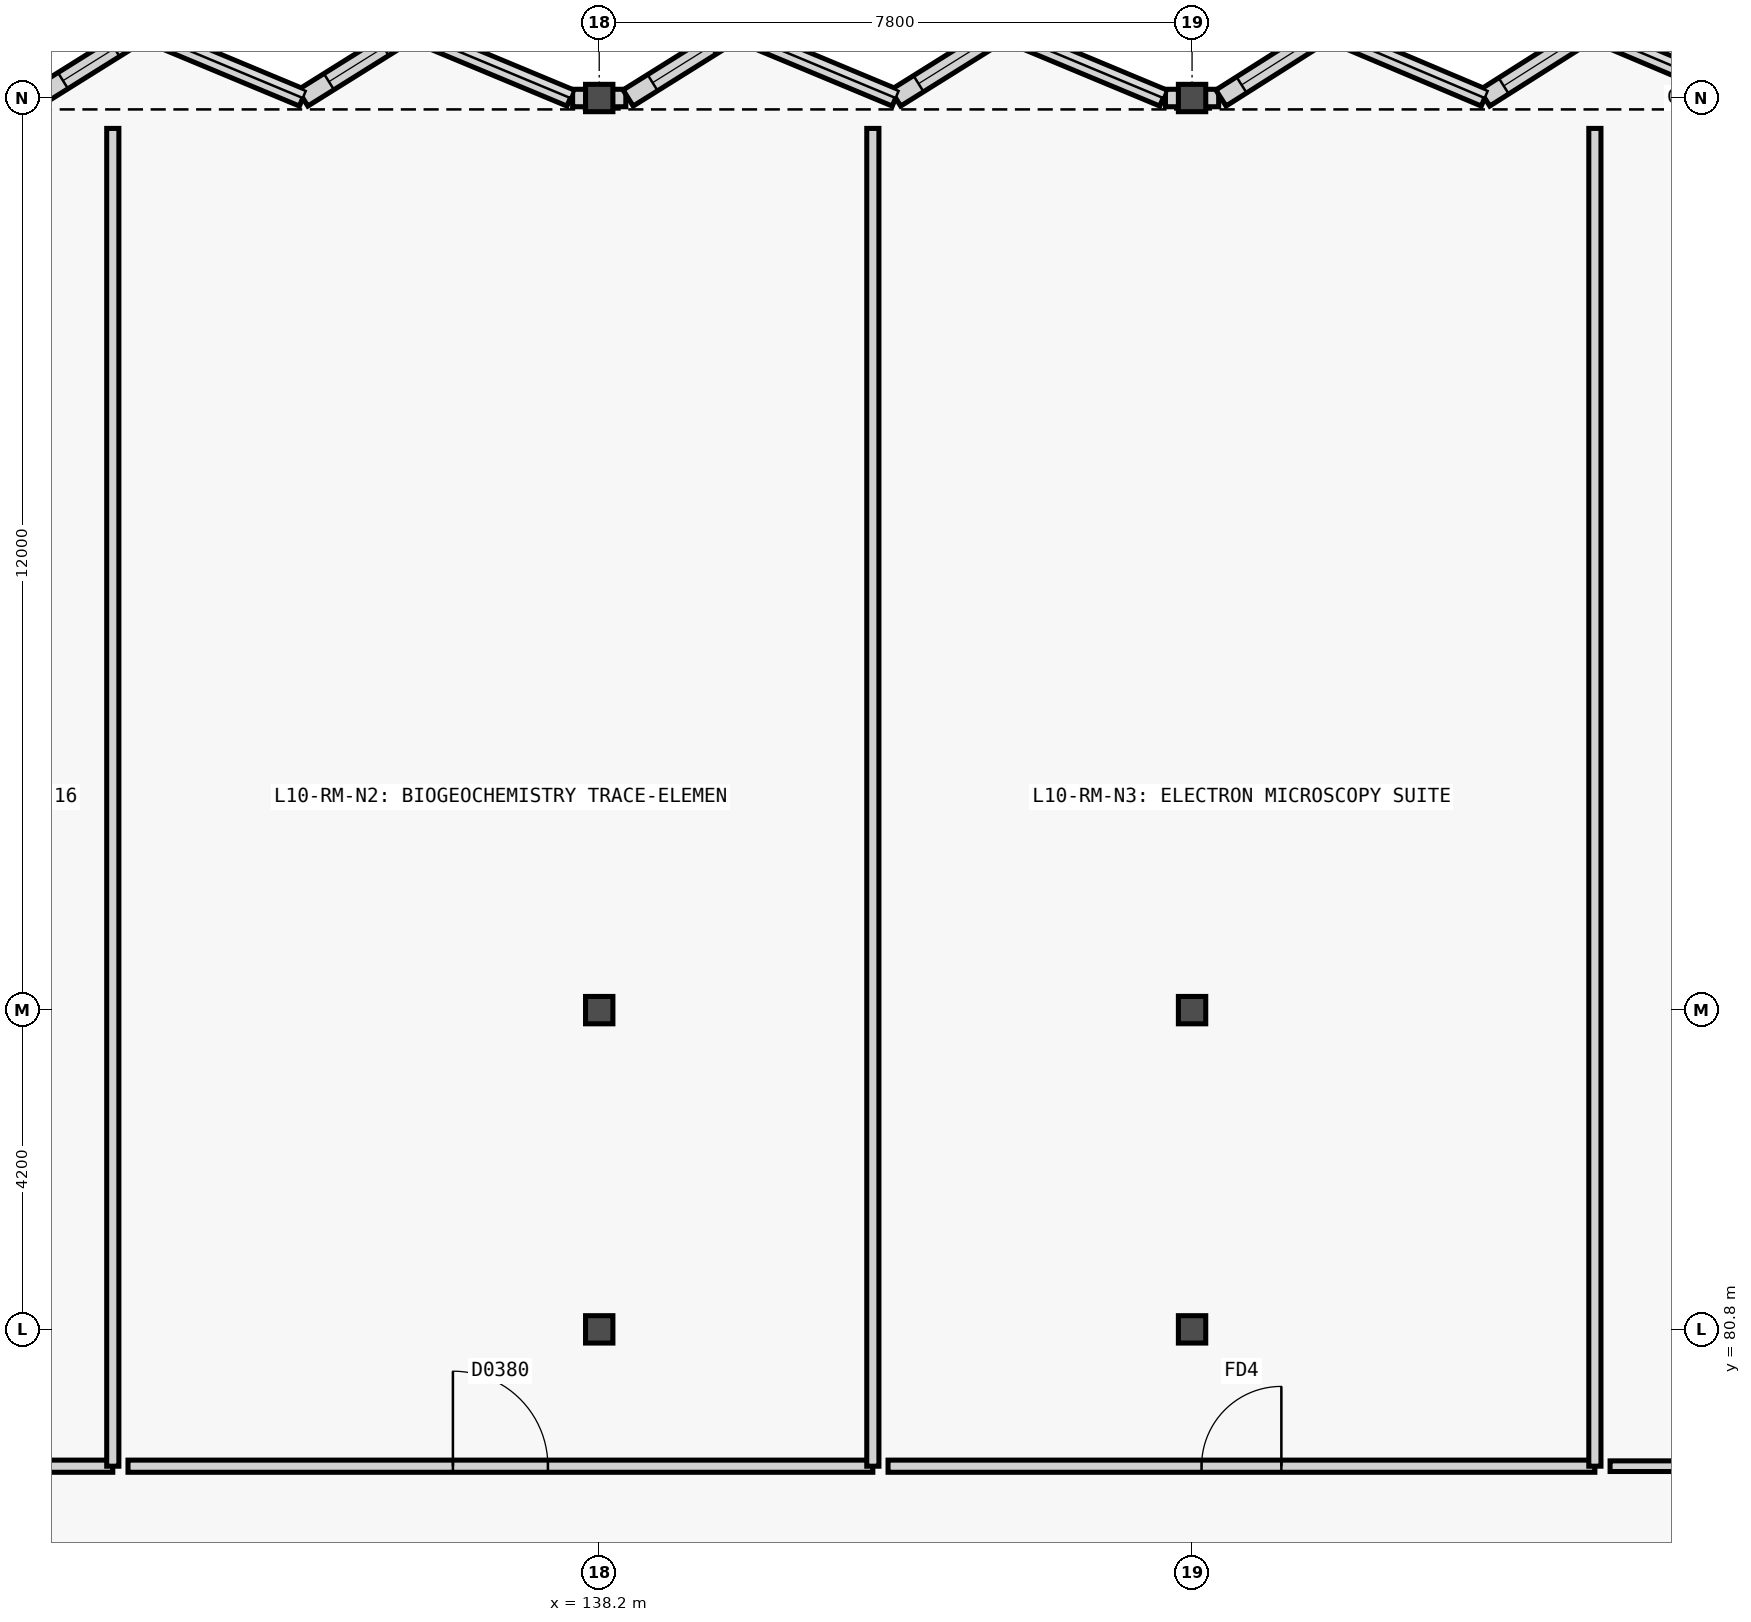
"""IFC4 building model, lengths in metres.
Left out: names, types, materials, properties, quantities, classifications, styles, units other than length and angle.
Written with IfcOpenShell. Run it as: python <this file> out.ifc"""

import sys

from ifc_helpers import new_model, si_unit, direction, frame, frame_2d, origin, origin_2d, place, context, subcontext, project, spatial, rectangle, extrude, element, fill, save


model = new_model("IFC4")
c1 = context("Model", 3, precision=1e-05, world=origin(), true_north=direction((0.0, 1.0)))
c2 = subcontext(c1, "Body", "Model", "MODEL_VIEW")
j1 = project(units=[si_unit("LENGTHUNIT", "METRE"), si_unit("PLANEANGLEUNIT", "RADIAN")], contexts=[c1])
p1 = place(None, origin())
s1 = spatial("IfcSite", under=j1, at=p1, CompositionType="ELEMENT")
p2 = place(p1, origin())
s2 = spatial("IfcBuilding", under=s1, at=p2, CompositionType="ELEMENT")
p3 = place(p2, frame((0.0, 0.0, 39.6)))
s3 = spatial("IfcBuildingStorey", under=s2, at=p3, CompositionType="ELEMENT", Elevation=39.6)
for number, where, z_axis, x_axis in (
    (1, (138.2, 80.8, 0.0), (0.0, 0.0, 1.0), (1.0, 0.0, 0.0)),
    (2, (138.2, 85.0, 0.0), (0.0, 0.0, 1.0), (1.0, 0.0, 0.0)),
    (3, (138.2, 97.0, 0.0), (0.0, 0.0, 1.0), (1.0, 0.0, 0.0)),
    (4, (146.0, 80.8, 0.0), (0.0, 0.0, 1.0), (1.0, 0.0, 0.0)),
    (5, (146.0, 85.0, 0.0), (0.0, 0.0, 1.0), (1.0, 0.0, 0.0)),
    (6, (146.0, 97.0, 0.0), (0.0, 0.0, 1.0), (1.0, 0.0, 0.0)),
):
    element("IfcColumn", number, at=place(p3, frame(where, z_axis=z_axis, x_axis=x_axis)), inside=s3, PredefinedType="COLUMN", context=c2, shape_type="SweptSolid", body=[
        extrude(rectangle(XDim=0.36, YDim=0.36, at=origin_2d()), origin(), (0.0, 0.0, 1.0), 3.6),
    ])
p4 = place(p3, frame((137.85, 97.0, 0.0), z_axis=(0.0, 0.0, 1.0), x_axis=(1.0, 0.0, 0.0)))
e7 = element("IfcWall", 7, at=p4, inside=s3, PredefinedType="SOLIDWALL", context=c2, shape_type="SweptSolid", body=[
    extrude(rectangle(XDim=0.35, YDim=0.23, at=frame_2d((0.175, 0.0))), origin(), (0.0, 0.0, 1.0), 3.36),
])
for number, where, z_axis, x_axis in (
    (8, (138.2, 97.0, 0.0), (0.0, 0.0, 1.0), (1.0, 0.0, 0.0)),
    (9, (145.65, 97.0, 0.0), (0.0, 0.0, 1.0), (1.0, 0.0, 0.0)),
    (10, (146.0, 97.0, 0.0), (0.0, 0.0, 1.0), (1.0, 0.0, 0.0)),
):
    element("IfcWall", number, at=place(p3, frame(where, z_axis=z_axis, x_axis=x_axis)), inside=s3, PredefinedType="SOLIDWALL", context=c2, shape_type="SweptSolid", body=[
        extrude(rectangle(XDim=0.35, YDim=0.23, at=frame_2d((0.175, 0.0))), origin(), (0.0, 0.0, 1.0), 3.36),
    ])
p5 = place(p3, frame((130.78, 97.0, 0.0), z_axis=(0.0, 0.0, 1.0), x_axis=(0.848023086369, 0.529959286158, 0.0)))
e11 = element("IfcWall", 11, at=p5, inside=s3, PredefinedType="SOLIDWALL", context=c2, shape_type="SweptSolid", body=[
    extrude(rectangle(XDim=1.66, YDim=0.25, at=frame_2d((0.83, 0.0))), origin(), (0.0, 0.0, 1.0), 3.36),
])
p6 = place(p5, frame((0.43, 0.0, 0.82)))
e12 = element("IfcOpeningElement", 12, at=p6, cuts=e11, PredefinedType="OPENING", context=c2, shape_type="SweptSolid", body=[
    extrude(rectangle(XDim=0.8, YDim=1.35, at=frame_2d((0.4, 0.675))), frame((0.0, 0.135, 0.0), z_axis=(0.0, -1.0, 0.0), x_axis=(1.0, 0.0, 0.0)), (0.0, 0.0, 1.0), 0.27),
])
p7 = place(p3, frame((132.188, 97.88, 0.0), z_axis=(0.0, 0.0, 1.0), x_axis=(0.92309902008, -0.384562347517, 0.0)))
e13 = element("IfcWall", 13, at=p7, inside=s3, PredefinedType="SOLIDWALL", context=c2, shape_type="SweptSolid", body=[
    extrude(rectangle(XDim=2.288, YDim=0.23, at=frame_2d((1.144, 0.0))), origin(), (0.0, 0.0, 1.0), 3.36),
])
p8 = place(p3, frame((134.3, 97.0, 0.0), z_axis=(0.0, 0.0, 1.0), x_axis=(0.848023086369, 0.529959286158, 0.0)))
e14 = element("IfcWall", 14, at=p8, inside=s3, PredefinedType="SOLIDWALL", context=c2, shape_type="SweptSolid", body=[
    extrude(rectangle(XDim=1.66, YDim=0.25, at=frame_2d((0.83, 0.0))), origin(), (0.0, 0.0, 1.0), 3.36),
])
p9 = place(p8, frame((0.405, 0.0, 0.82)))
e15 = element("IfcOpeningElement", 15, at=p9, cuts=e14, PredefinedType="OPENING", context=c2, shape_type="SweptSolid", body=[
    extrude(rectangle(XDim=0.85, YDim=1.4, at=frame_2d((0.425, 0.7))), frame((0.0, 0.135, 0.0), z_axis=(0.0, -1.0, 0.0), x_axis=(1.0, 0.0, 0.0)), (0.0, 0.0, 1.0), 0.27),
])
p10 = place(p3, frame((135.708, 97.88, 0.0), z_axis=(0.0, 0.0, 1.0), x_axis=(0.92309902008, -0.384562347517, 0.0)))
e16 = element("IfcWall", 16, at=p10, inside=s3, PredefinedType="SOLIDWALL", context=c2, shape_type="SweptSolid", body=[
    extrude(rectangle(XDim=2.288, YDim=0.23, at=frame_2d((1.144, 0.0))), origin(), (0.0, 0.0, 1.0), 3.36),
])
p11 = place(p3, frame((138.58, 97.0, 0.0), z_axis=(0.0, 0.0, 1.0), x_axis=(0.848023086369, 0.529959286158, 0.0)))
e17 = element("IfcWall", 17, at=p11, inside=s3, PredefinedType="SOLIDWALL", context=c2, shape_type="SweptSolid", body=[
    extrude(rectangle(XDim=1.66, YDim=0.25, at=frame_2d((0.83, 0.0))), origin(), (0.0, 0.0, 1.0), 3.36),
])
p12 = place(p11, frame((0.38, 0.0, 0.82)))
e18 = element("IfcOpeningElement", 18, at=p12, cuts=e17, PredefinedType="OPENING", context=c2, shape_type="SweptSolid", body=[
    extrude(rectangle(XDim=0.9, YDim=1.45, at=frame_2d((0.45, 0.725))), frame((0.0, 0.135, 0.0), z_axis=(0.0, -1.0, 0.0), x_axis=(1.0, 0.0, 0.0)), (0.0, 0.0, 1.0), 0.27),
])
p13 = place(p3, frame((139.988, 97.88, 0.0), z_axis=(0.0, 0.0, 1.0), x_axis=(0.92309902008, -0.384562347517, 0.0)))
e19 = element("IfcWall", 19, at=p13, inside=s3, PredefinedType="SOLIDWALL", context=c2, shape_type="SweptSolid", body=[
    extrude(rectangle(XDim=2.288, YDim=0.23, at=frame_2d((1.144, 0.0))), origin(), (0.0, 0.0, 1.0), 3.36),
])
p14 = place(p3, frame((142.1, 97.0, 0.0), z_axis=(0.0, 0.0, 1.0), x_axis=(0.848023086369, 0.529959286158, 0.0)))
e20 = element("IfcWall", 20, at=p14, inside=s3, PredefinedType="SOLIDWALL", context=c2, shape_type="SweptSolid", body=[
    extrude(rectangle(XDim=1.66, YDim=0.25, at=frame_2d((0.83, 0.0))), origin(), (0.0, 0.0, 1.0), 3.36),
])
p15 = place(p14, frame((0.355, 0.0, 0.82)))
e21 = element("IfcOpeningElement", 21, at=p15, cuts=e20, PredefinedType="OPENING", context=c2, shape_type="SweptSolid", body=[
    extrude(rectangle(XDim=0.95, YDim=1.5, at=frame_2d((0.475, 0.75))), frame((0.0, 0.135, 0.0), z_axis=(0.0, -1.0, 0.0), x_axis=(1.0, 0.0, 0.0)), (0.0, 0.0, 1.0), 0.27),
])
p16 = place(p3, frame((143.508, 97.88, 0.0), z_axis=(0.0, 0.0, 1.0), x_axis=(0.92309902008, -0.384562347517, 0.0)))
e22 = element("IfcWall", 22, at=p16, inside=s3, PredefinedType="SOLIDWALL", context=c2, shape_type="SweptSolid", body=[
    extrude(rectangle(XDim=2.288, YDim=0.23, at=frame_2d((1.144, 0.0))), origin(), (0.0, 0.0, 1.0), 3.36),
])
p17 = place(p3, frame((146.38, 97.0, 0.0), z_axis=(0.0, 0.0, 1.0), x_axis=(0.844626536799, 0.535355968805, 0.0)))
e23 = element("IfcWall", 23, at=p17, inside=s3, PredefinedType="SOLIDWALL", context=c2, shape_type="SweptSolid", body=[
    extrude(rectangle(XDim=1.644, YDim=0.25, at=frame_2d((0.822, 0.0))), origin(), (0.0, 0.0, 1.0), 3.36),
])
p18 = place(p17, frame((0.322, 0.0, 0.82)))
e24 = element("IfcOpeningElement", 24, at=p18, cuts=e23, PredefinedType="OPENING", context=c2, shape_type="SweptSolid", body=[
    extrude(rectangle(XDim=1.0, YDim=1.35, at=frame_2d((0.5, 0.675))), frame((0.0, 0.135, 0.0), z_axis=(0.0, -1.0, 0.0), x_axis=(1.0, 0.0, 0.0)), (0.0, 0.0, 1.0), 0.27),
])
p19 = place(p3, frame((147.768, 97.88, 0.0), z_axis=(0.0, 0.0, 1.0), x_axis=(0.921122216024, -0.389273506866, 0.0)))
e25 = element("IfcWall", 25, at=p19, inside=s3, PredefinedType="SOLIDWALL", context=c2, shape_type="SweptSolid", body=[
    extrude(rectangle(XDim=2.26, YDim=0.23, at=frame_2d((1.13, 0.0))), origin(), (0.0, 0.0, 1.0), 3.36),
])
p20 = place(p3, frame((149.85, 97.0, 0.0), z_axis=(0.0, 0.0, 1.0), x_axis=(0.844583954912, 0.535423143976, 0.0)))
e26 = element("IfcWall", 26, at=p20, inside=s3, PredefinedType="SOLIDWALL", context=c2, shape_type="SweptSolid", body=[
    extrude(rectangle(XDim=1.643, YDim=0.25, at=frame_2d((0.822, 0.0))), origin(), (0.0, 0.0, 1.0), 3.36),
])
p21 = place(p20, frame((0.297, 0.0, 0.82)))
e27 = element("IfcOpeningElement", 27, at=p21, cuts=e26, PredefinedType="OPENING", context=c2, shape_type="SweptSolid", body=[
    extrude(rectangle(XDim=1.05, YDim=1.4, at=frame_2d((0.525, 0.7))), frame((0.0, 0.135, 0.0), z_axis=(0.0, -1.0, 0.0), x_axis=(1.0, 0.0, 0.0)), (0.0, 0.0, 1.0), 0.27),
])
p22 = place(p3, frame((151.238, 97.88, 0.0), z_axis=(0.0, 0.0, 1.0), x_axis=(0.921122216024, -0.389273506866, 0.0)))
e28 = element("IfcWall", 28, at=p22, inside=s3, PredefinedType="SOLIDWALL", context=c2, shape_type="SweptSolid", body=[
    extrude(rectangle(XDim=2.26, YDim=0.23, at=frame_2d((1.13, 0.0))), origin(), (0.0, 0.0, 1.0), 3.36),
])
p23 = place(p3, frame((122.8, 79.0, 0.0), z_axis=(0.0, 0.0, 1.0), x_axis=(1.0, 0.0, 0.0)))
e29 = element("IfcWall", 29, at=p23, inside=s3, PredefinedType="PARTITIONING", context=c2, shape_type="SweptSolid", body=[
    extrude(rectangle(XDim=9.0, YDim=0.16, at=frame_2d((4.5, 0.0))), origin(), (0.0, 0.0, 1.0), 3.34),
])
p24 = place(p23, frame((3.975, 0.0, 0.0)))
e30 = element("IfcOpeningElement", 30, at=p24, cuts=e29, PredefinedType="OPENING", context=c2, shape_type="SweptSolid", body=[
    extrude(rectangle(XDim=1.05, YDim=2.15, at=frame_2d((0.525, 1.075))), frame((0.0, 0.09, 0.0), z_axis=(0.0, -1.0, 0.0), x_axis=(1.0, 0.0, 0.0)), (0.0, 0.0, 1.0), 0.18),
])
p25 = place(p3, frame((131.8, 79.0, 0.0), z_axis=(0.0, 0.0, 1.0), x_axis=(0.0, 1.0, 0.0)))
e31 = element("IfcWall", 31, at=p25, inside=s3, PredefinedType="PARTITIONING", context=c2, shape_type="SweptSolid", body=[
    extrude(rectangle(XDim=17.6, YDim=0.16, at=frame_2d((8.8, 0.0))), origin(), (0.0, 0.0, 1.0), 3.34),
])
p26 = place(p3, frame((132.0, 79.0, 0.0), z_axis=(0.0, 0.0, 1.0), x_axis=(1.0, 0.0, 0.0)))
e32 = element("IfcWall", 32, at=p26, inside=s3, PredefinedType="PARTITIONING", context=c2, shape_type="SweptSolid", body=[
    extrude(rectangle(XDim=9.8, YDim=0.16, at=frame_2d((4.9, 0.0))), origin(), (0.0, 0.0, 1.0), 3.34),
])
p27 = place(p26, frame((4.275, 0.0, 0.0)))
e33 = element("IfcOpeningElement", 33, at=p27, cuts=e32, PredefinedType="OPENING", context=c2, shape_type="SweptSolid", body=[
    extrude(rectangle(XDim=1.25, YDim=2.2, at=frame_2d((0.625, 1.1))), frame((0.0, 0.09, 0.0), z_axis=(0.0, -1.0, 0.0), x_axis=(1.0, 0.0, 0.0)), (0.0, 0.0, 1.0), 0.18),
])
p28 = place(p3, frame((141.8, 79.0, 0.0), z_axis=(0.0, 0.0, 1.0), x_axis=(0.0, 1.0, 0.0)))
e34 = element("IfcWall", 34, at=p28, inside=s3, PredefinedType="PARTITIONING", context=c2, shape_type="SweptSolid", body=[
    extrude(rectangle(XDim=17.6, YDim=0.16, at=frame_2d((8.8, 0.0))), origin(), (0.0, 0.0, 1.0), 2.91),
])
p29 = place(p3, frame((142.0, 79.0, 0.0), z_axis=(0.0, 0.0, 1.0), x_axis=(1.0, 0.0, 0.0)))
e35 = element("IfcWall", 35, at=p29, inside=s3, PredefinedType="PARTITIONING", context=c2, shape_type="SweptSolid", body=[
    extrude(rectangle(XDim=9.3, YDim=0.16, at=frame_2d((4.65, 0.0))), origin(), (0.0, 0.0, 1.0), 3.34),
])
p30 = place(p29, frame((4.125, 0.0, 0.0)))
e36 = element("IfcOpeningElement", 36, at=p30, cuts=e35, PredefinedType="OPENING", context=c2, shape_type="SweptSolid", body=[
    extrude(rectangle(XDim=1.05, YDim=2.15, at=frame_2d((0.525, 1.075))), frame((0.0, 0.09, 0.0), z_axis=(0.0, -1.0, 0.0), x_axis=(1.0, 0.0, 0.0)), (0.0, 0.0, 1.0), 0.18),
])
p31 = place(p3, frame((151.3, 79.0, 0.0), z_axis=(0.0, 0.0, 1.0), x_axis=(0.0, 1.0, 0.0)))
e37 = element("IfcWall", 37, at=p31, inside=s3, PredefinedType="PARTITIONING", context=c2, shape_type="SweptSolid", body=[
    extrude(rectangle(XDim=17.6, YDim=0.16, at=frame_2d((8.8, 0.0))), origin(), (0.0, 0.0, 1.0), 3.34),
])
p32 = place(p3, frame((151.5, 79.0, 0.0), z_axis=(0.0, 0.0, 1.0), x_axis=(1.0, 0.0, 0.0)))
e38 = element("IfcWall", 38, at=p32, inside=s3, PredefinedType="PARTITIONING", context=c2, shape_type="SweptSolid", body=[
    extrude(rectangle(XDim=9.1, YDim=0.14, at=frame_2d((4.55, 0.0))), origin(), (0.0, 0.0, 1.0), 3.34),
])
p33 = place(p32, frame((4.09, 0.0, 0.0)))
e39 = element("IfcOpeningElement", 39, at=p33, cuts=e38, PredefinedType="OPENING", context=c2, shape_type="SweptSolid", body=[
    extrude(rectangle(XDim=0.92, YDim=2.15, at=frame_2d((0.46, 1.075))), frame((0.0, 0.08, 0.0), z_axis=(0.0, -1.0, 0.0), x_axis=(1.0, 0.0, 0.0)), (0.0, 0.0, 1.0), 0.16),
])
p34 = place(p6, origin())
e40 = element("IfcWindow", 40, at=p34, inside=s3, PartitioningType="SINGLE_PANEL", PredefinedType="WINDOW", context=c2, shape_type="SweptSolid", body=[
    extrude(rectangle(XDim=0.8, YDim=1.35, at=frame_2d((0.4, 0.675))), frame((0.0, 0.03, 0.0), z_axis=(0.0, -1.0, 0.0), x_axis=(1.0, 0.0, 0.0)), (0.0, 0.0, 1.0), 0.06),
])
fill(e12, e40)
p35 = place(p9, origin())
e41 = element("IfcWindow", 41, at=p35, inside=s3, PartitioningType="SINGLE_PANEL", PredefinedType="WINDOW", context=c2, shape_type="SweptSolid", body=[
    extrude(rectangle(XDim=0.85, YDim=1.4, at=frame_2d((0.425, 0.7))), frame((0.0, 0.03, 0.0), z_axis=(0.0, -1.0, 0.0), x_axis=(1.0, 0.0, 0.0)), (0.0, 0.0, 1.0), 0.06),
])
fill(e15, e41)
p36 = place(p12, origin())
e42 = element("IfcWindow", 42, at=p36, inside=s3, PartitioningType="SINGLE_PANEL", PredefinedType="WINDOW", context=c2, shape_type="SweptSolid", body=[
    extrude(rectangle(XDim=0.9, YDim=1.45, at=frame_2d((0.45, 0.725))), frame((0.0, 0.03, 0.0), z_axis=(0.0, -1.0, 0.0), x_axis=(1.0, 0.0, 0.0)), (0.0, 0.0, 1.0), 0.06),
])
fill(e18, e42)
p37 = place(p15, origin())
e43 = element("IfcWindow", 43, at=p37, inside=s3, PartitioningType="SINGLE_PANEL", PredefinedType="WINDOW", context=c2, shape_type="SweptSolid", body=[
    extrude(rectangle(XDim=0.95, YDim=1.5, at=frame_2d((0.475, 0.75))), frame((0.0, 0.03, 0.0), z_axis=(0.0, -1.0, 0.0), x_axis=(1.0, 0.0, 0.0)), (0.0, 0.0, 1.0), 0.06),
])
fill(e21, e43)
p38 = place(p18, origin())
e44 = element("IfcWindow", 44, at=p38, inside=s3, PartitioningType="SINGLE_PANEL", PredefinedType="WINDOW", context=c2, shape_type="SweptSolid", body=[
    extrude(rectangle(XDim=1.0, YDim=1.35, at=frame_2d((0.5, 0.675))), frame((0.0, 0.03, 0.0), z_axis=(0.0, -1.0, 0.0), x_axis=(1.0, 0.0, 0.0)), (0.0, 0.0, 1.0), 0.06),
])
fill(e24, e44)
p39 = place(p21, origin())
e45 = element("IfcWindow", 45, at=p39, inside=s3, PartitioningType="SINGLE_PANEL", PredefinedType="WINDOW", context=c2, shape_type="SweptSolid", body=[
    extrude(rectangle(XDim=1.05, YDim=1.4, at=frame_2d((0.525, 0.7))), frame((0.0, 0.03, 0.0), z_axis=(0.0, -1.0, 0.0), x_axis=(1.0, 0.0, 0.0)), (0.0, 0.0, 1.0), 0.06),
])
fill(e27, e45)
p40 = place(p27, origin())
e46 = element("IfcDoor", 46, at=p40, inside=s3, OperationType="SINGLE_SWING_LEFT", PredefinedType="DOOR", context=c2, shape_type="SweptSolid", body=[
    extrude(rectangle(XDim=1.25, YDim=2.2, at=frame_2d((0.625, 1.1))), frame((0.0, 0.025, 0.0), z_axis=(0.0, -1.0, 0.0), x_axis=(1.0, 0.0, 0.0)), (0.0, 0.0, 1.0), 0.05),
])
fill(e33, e46)
p41 = place(p30, origin())
e47 = element("IfcDoor", 47, at=p41, inside=s3, OperationType="SINGLE_SWING_RIGHT", PredefinedType="DOOR", context=c2, shape_type="SweptSolid", body=[
    extrude(rectangle(XDim=1.05, YDim=2.15, at=frame_2d((0.525, 1.075))), frame((0.0, 0.025, 0.0), z_axis=(0.0, -1.0, 0.0), x_axis=(1.0, 0.0, 0.0)), (0.0, 0.0, 1.0), 0.05),
])
fill(e36, e47)
save(model, sys.argv[1])
